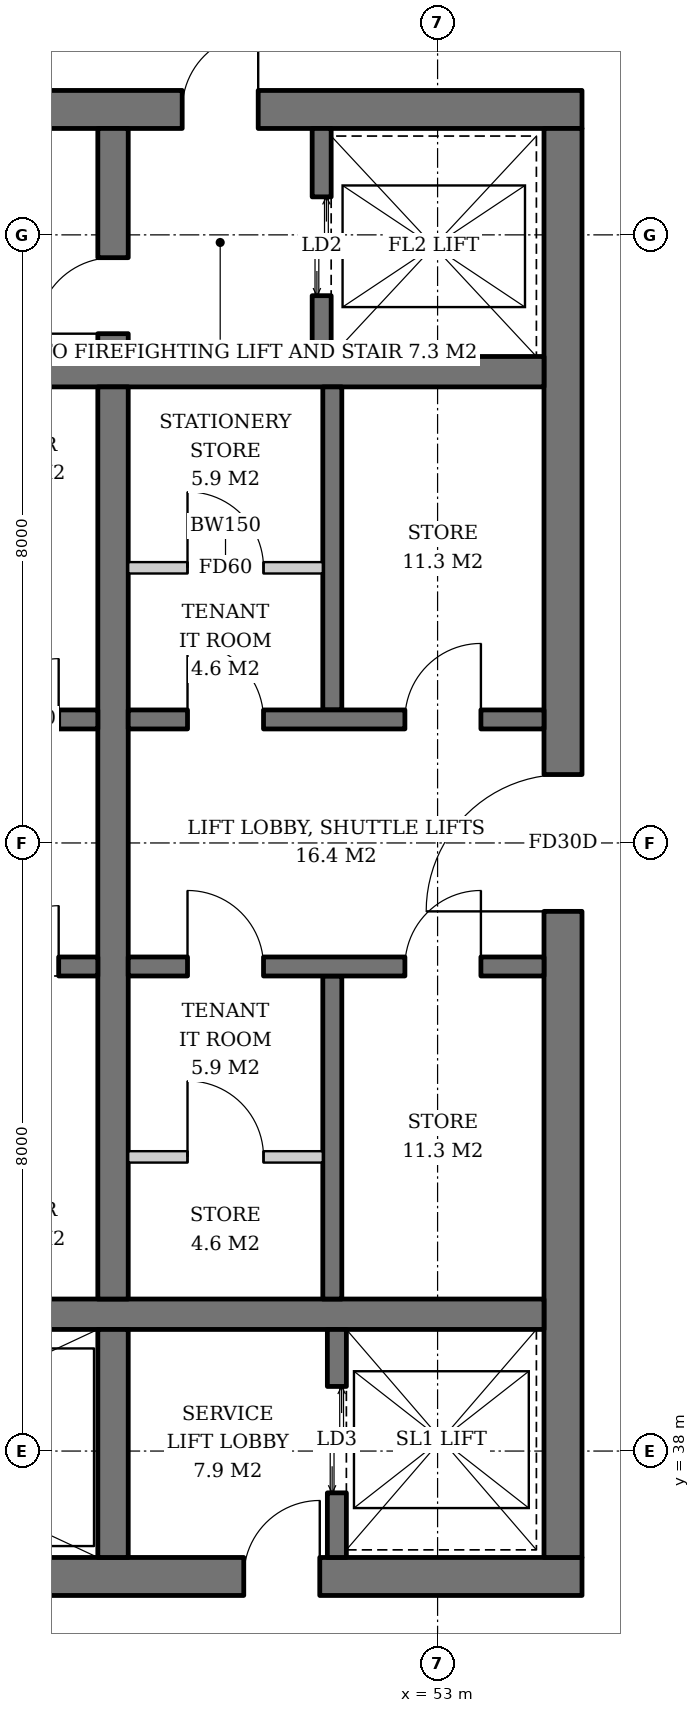
"""IFC4 building model, lengths in metres.
Left out: names, types, materials, properties, quantities, classifications, styles, units other than length and angle.
Written with IfcOpenShell. Run it as: python <this file> out.ifc"""

import sys

from ifc_helpers import new_model, si_unit, direction, frame, frame_2d, origin, place, context, subcontext, project, spatial, rectangle, extrude, element, fill, save


model = new_model("IFC4")
c1 = context("Model", 3, precision=1e-05, world=origin(), true_north=direction((0.0, 1.0)))
c2 = subcontext(c1, "Body", "Model", "MODEL_VIEW")
j1 = project(units=[si_unit("LENGTHUNIT", "METRE"), si_unit("PLANEANGLEUNIT", "RADIAN")], contexts=[c1])
p1 = place(None, origin())
s1 = spatial("IfcSite", under=j1, at=p1, CompositionType="ELEMENT")
p2 = place(p1, origin())
s2 = spatial("IfcBuilding", under=s1, at=p2, CompositionType="ELEMENT")
p3 = place(p2, frame((0.0, 0.0, 271.8)))
s3 = spatial("IfcBuildingStorey", under=s2, at=p3, CompositionType="ELEMENT", Elevation=271.8)
p4 = place(p3, frame((35.1, 36.35, 0.0), z_axis=(0.0, 0.0, 1.0), x_axis=(1.0, 0.0, 0.0)))
e1 = element("IfcWall", 1, at=p4, inside=s3, PredefinedType="SHEAR", context=c2, shape_type="SweptSolid", body=[
    extrude(rectangle(XDim=19.8, YDim=0.5, at=frame_2d((9.9, 0.0))), origin(), (0.0, 0.0, 1.0), 3.8),
])
p5 = place(p4, frame((3.9, 0.0, 0.0)))
e2 = element("IfcOpeningElement", 2, at=p5, cuts=e1, PredefinedType="OPENING", context=c2, shape_type="SweptSolid", body=[
    extrude(rectangle(XDim=1.0, YDim=2.1, at=frame_2d((0.5, 1.05))), frame((0.0, 0.26, 0.0), z_axis=(0.0, -1.0, 0.0), x_axis=(1.0, 0.0, 0.0)), (0.0, 0.0, 1.0), 0.52),
])
p6 = place(p4, frame((15.35, 0.0, 0.0)))
e3 = element("IfcOpeningElement", 3, at=p6, cuts=e1, PredefinedType="OPENING", context=c2, shape_type="SweptSolid", body=[
    extrude(rectangle(XDim=1.0, YDim=2.1, at=frame_2d((0.5, 1.05))), frame((0.0, 0.26, 0.0), z_axis=(0.0, -1.0, 0.0), x_axis=(1.0, 0.0, 0.0)), (0.0, 0.0, 1.0), 0.52),
])
p7 = place(p3, frame((35.1, 55.65, 0.0), z_axis=(0.0, 0.0, 1.0), x_axis=(1.0, 0.0, 0.0)))
e4 = element("IfcWall", 4, at=p7, inside=s3, PredefinedType="SHEAR", context=c2, shape_type="SweptSolid", body=[
    extrude(rectangle(XDim=19.8, YDim=0.5, at=frame_2d((9.9, 0.0))), origin(), (0.0, 0.0, 1.0), 3.8),
])
p8 = place(p7, frame((14.54, 0.0, 0.0)))
e5 = element("IfcOpeningElement", 5, at=p8, cuts=e4, PredefinedType="OPENING", context=c2, shape_type="SweptSolid", body=[
    extrude(rectangle(XDim=1.0, YDim=2.1, at=frame_2d((0.5, 1.05))), frame((0.0, 0.26, 0.0), z_axis=(0.0, -1.0, 0.0), x_axis=(1.0, 0.0, 0.0)), (0.0, 0.0, 1.0), 0.52),
])
p9 = place(p7, frame((2.375, 0.0, 0.0)))
e6 = element("IfcOpeningElement", 6, at=p9, cuts=e4, PredefinedType="OPENING", context=c2, shape_type="SweptSolid", body=[
    extrude(rectangle(XDim=1.0, YDim=2.1, at=frame_2d((0.5, 1.05))), frame((0.0, 0.26, 0.0), z_axis=(0.0, -1.0, 0.0), x_axis=(1.0, 0.0, 0.0)), (0.0, 0.0, 1.0), 0.52),
])
p10 = place(p3, frame((54.65, 36.6, 0.0), z_axis=(0.0, 0.0, 1.0), x_axis=(0.0, 1.0, 0.0)))
e7 = element("IfcWall", 7, at=p10, inside=s3, PredefinedType="SHEAR", context=c2, shape_type="SweptSolid", body=[
    extrude(rectangle(XDim=18.8, YDim=0.5, at=frame_2d((9.4, 0.0))), origin(), (0.0, 0.0, 1.0), 3.8),
])
p11 = place(p10, frame((8.5, 0.0, 0.0)))
e8 = element("IfcOpeningElement", 8, at=p11, cuts=e7, PredefinedType="OPENING", context=c2, shape_type="SweptSolid", body=[
    extrude(rectangle(XDim=1.8, YDim=2.4, at=frame_2d((0.9, 1.2))), frame((0.0, 0.26, 0.0), z_axis=(0.0, -1.0, 0.0), x_axis=(1.0, 0.0, 0.0)), (0.0, 0.0, 1.0), 0.52),
])
for number, where, z_axis, x_axis in (
    (9, (35.6, 39.8, 0.0), (0.0, 0.0, 1.0), (1.0, 0.0, 0.0)),
    (10, (35.6, 52.2, 0.0), (0.0, 0.0, 1.0), (1.0, 0.0, 0.0)),
):
    element("IfcWall", number, at=place(p3, frame(where, z_axis=z_axis, x_axis=x_axis)), inside=s3, PredefinedType="SHEAR", context=c2, shape_type="SweptSolid", body=[
        extrude(rectangle(XDim=18.8, YDim=0.4, at=frame_2d((9.4, 0.0))), origin(), (0.0, 0.0, 1.0), 3.8),
    ])
p12 = place(p3, frame((48.73, 36.6, 0.0), z_axis=(0.0, 0.0, 1.0), x_axis=(0.0, 1.0, 0.0)))
e11 = element("IfcWall", 11, at=p12, inside=s3, PredefinedType="SHEAR", context=c2, shape_type="SweptSolid", body=[
    extrude(rectangle(XDim=3.0, YDim=0.4, at=frame_2d((1.5, 0.0))), origin(), (0.0, 0.0, 1.0), 3.8),
])
p13 = place(p3, frame((48.73, 40.0, 0.0), z_axis=(0.0, 0.0, 1.0), x_axis=(0.0, 1.0, 0.0)))
e12 = element("IfcWall", 12, at=p13, inside=s3, PredefinedType="SHEAR", context=c2, shape_type="SweptSolid", body=[
    extrude(rectangle(XDim=12.0, YDim=0.4, at=frame_2d((6.0, 0.0))), origin(), (0.0, 0.0, 1.0), 3.8),
])
p14 = place(p3, frame((48.73, 52.4, 0.0), z_axis=(0.0, 0.0, 1.0), x_axis=(0.0, 1.0, 0.0)))
e13 = element("IfcWall", 13, at=p14, inside=s3, PredefinedType="SHEAR", context=c2, shape_type="SweptSolid", body=[
    extrude(rectangle(XDim=3.0, YDim=0.4, at=frame_2d((1.5, 0.0))), origin(), (0.0, 0.0, 1.0), 3.8),
])
p15 = place(p14, frame((0.3, 0.0, 0.0)))
e14 = element("IfcOpeningElement", 14, at=p15, cuts=e13, PredefinedType="OPENING", context=c2, shape_type="SweptSolid", body=[
    extrude(rectangle(XDim=1.0, YDim=2.1, at=frame_2d((0.5, 1.05))), frame((0.0, 0.21, 0.0), z_axis=(0.0, -1.0, 0.0), x_axis=(1.0, 0.0, 0.0)), (0.0, 0.0, 1.0), 0.42),
])
p16 = place(p3, frame((51.675, 36.6, 0.0), z_axis=(0.0, 0.0, 1.0), x_axis=(0.0, 1.0, 0.0)))
e15 = element("IfcWall", 15, at=p16, inside=s3, PredefinedType="SHEAR", context=c2, shape_type="SweptSolid", body=[
    extrude(rectangle(XDim=3.0, YDim=0.25, at=frame_2d((1.5, 0.0))), origin(), (0.0, 0.0, 1.0), 3.8),
])
p17 = place(p16, frame((0.85, 0.0, 0.0)))
e16 = element("IfcOpeningElement", 16, at=p17, cuts=e15, PredefinedType="OPENING", context=c2, shape_type="SweptSolid", body=[
    extrude(rectangle(XDim=1.4, YDim=2.4, at=frame_2d((0.7, 1.2))), frame((0.0, 0.135, 0.0), z_axis=(0.0, -1.0, 0.0), x_axis=(1.0, 0.0, 0.0)), (0.0, 0.0, 1.0), 0.27),
])
p18 = place(p3, frame((51.475, 52.4, 0.0), z_axis=(0.0, 0.0, 1.0), x_axis=(0.0, 1.0, 0.0)))
e17 = element("IfcWall", 17, at=p18, inside=s3, PredefinedType="SHEAR", context=c2, shape_type="SweptSolid", body=[
    extrude(rectangle(XDim=3.0, YDim=0.25, at=frame_2d((1.5, 0.0))), origin(), (0.0, 0.0, 1.0), 3.8),
])
p19 = place(p18, frame((0.8, 0.0, 0.0)))
e18 = element("IfcOpeningElement", 18, at=p19, cuts=e17, PredefinedType="OPENING", context=c2, shape_type="SweptSolid", body=[
    extrude(rectangle(XDim=1.3, YDim=2.2, at=frame_2d((0.65, 1.1))), frame((0.0, 0.135, 0.0), z_axis=(0.0, -1.0, 0.0), x_axis=(1.0, 0.0, 0.0)), (0.0, 0.0, 1.0), 0.27),
])
p20 = place(p3, frame((35.6, 47.625, 0.0), z_axis=(0.0, 0.0, 1.0), x_axis=(1.0, 0.0, 0.0)))
e19 = element("IfcWall", 19, at=p20, inside=s3, PredefinedType="SHEAR", context=c2, shape_type="SweptSolid", body=[
    extrude(rectangle(XDim=12.93, YDim=0.25, at=frame_2d((6.465, 0.0))), origin(), (0.0, 0.0, 1.0), 3.8),
])
p21 = place(p20, frame((0.75, 0.0, 0.0)))
e20 = element("IfcOpeningElement", 20, at=p21, cuts=e19, PredefinedType="OPENING", context=c2, shape_type="SweptSolid", body=[
    extrude(rectangle(XDim=1.1, YDim=2.2, at=frame_2d((0.55, 1.1))), frame((0.0, 0.135, 0.0), z_axis=(0.0, -1.0, 0.0), x_axis=(1.0, 0.0, 0.0)), (0.0, 0.0, 1.0), 0.27),
])
p22 = place(p20, frame((3.55, 0.0, 0.0)))
e21 = element("IfcOpeningElement", 21, at=p22, cuts=e19, PredefinedType="OPENING", context=c2, shape_type="SweptSolid", body=[
    extrude(rectangle(XDim=1.1, YDim=2.2, at=frame_2d((0.55, 1.1))), frame((0.0, 0.135, 0.0), z_axis=(0.0, -1.0, 0.0), x_axis=(1.0, 0.0, 0.0)), (0.0, 0.0, 1.0), 0.27),
])
p23 = place(p20, frame((6.3, 0.0, 0.0)))
e22 = element("IfcOpeningElement", 22, at=p23, cuts=e19, PredefinedType="OPENING", context=c2, shape_type="SweptSolid", body=[
    extrude(rectangle(XDim=1.1, YDim=2.2, at=frame_2d((0.55, 1.1))), frame((0.0, 0.135, 0.0), z_axis=(0.0, -1.0, 0.0), x_axis=(1.0, 0.0, 0.0)), (0.0, 0.0, 1.0), 0.27),
])
p24 = place(p20, frame((9.1, 0.0, 0.0)))
e23 = element("IfcOpeningElement", 23, at=p24, cuts=e19, PredefinedType="OPENING", context=c2, shape_type="SweptSolid", body=[
    extrude(rectangle(XDim=1.0, YDim=2.1, at=frame_2d((0.5, 1.05))), frame((0.0, 0.135, 0.0), z_axis=(0.0, -1.0, 0.0), x_axis=(1.0, 0.0, 0.0)), (0.0, 0.0, 1.0), 0.27),
])
p25 = place(p20, frame((11.615, 0.0, 0.0)))
e24 = element("IfcOpeningElement", 24, at=p25, cuts=e19, PredefinedType="OPENING", context=c2, shape_type="SweptSolid", body=[
    extrude(rectangle(XDim=0.8, YDim=2.0, at=frame_2d((0.4, 1.0))), frame((0.0, 0.135, 0.0), z_axis=(0.0, -1.0, 0.0), x_axis=(1.0, 0.0, 0.0)), (0.0, 0.0, 1.0), 0.27),
])
p26 = place(p3, frame((35.6, 44.375, 0.0), z_axis=(0.0, 0.0, 1.0), x_axis=(1.0, 0.0, 0.0)))
e25 = element("IfcWall", 25, at=p26, inside=s3, PredefinedType="SHEAR", context=c2, shape_type="SweptSolid", body=[
    extrude(rectangle(XDim=12.93, YDim=0.25, at=frame_2d((6.465, 0.0))), origin(), (0.0, 0.0, 1.0), 3.8),
])
p27 = place(p26, frame((0.75, 0.0, 0.0)))
e26 = element("IfcOpeningElement", 26, at=p27, cuts=e25, PredefinedType="OPENING", context=c2, shape_type="SweptSolid", body=[
    extrude(rectangle(XDim=1.1, YDim=2.2, at=frame_2d((0.55, 1.1))), frame((0.0, 0.135, 0.0), z_axis=(0.0, -1.0, 0.0), x_axis=(1.0, 0.0, 0.0)), (0.0, 0.0, 1.0), 0.27),
])
p28 = place(p26, frame((3.55, 0.0, 0.0)))
e27 = element("IfcOpeningElement", 27, at=p28, cuts=e25, PredefinedType="OPENING", context=c2, shape_type="SweptSolid", body=[
    extrude(rectangle(XDim=1.1, YDim=2.2, at=frame_2d((0.55, 1.1))), frame((0.0, 0.135, 0.0), z_axis=(0.0, -1.0, 0.0), x_axis=(1.0, 0.0, 0.0)), (0.0, 0.0, 1.0), 0.27),
])
p29 = place(p26, frame((6.3, 0.0, 0.0)))
e28 = element("IfcOpeningElement", 28, at=p29, cuts=e25, PredefinedType="OPENING", context=c2, shape_type="SweptSolid", body=[
    extrude(rectangle(XDim=1.1, YDim=2.2, at=frame_2d((0.55, 1.1))), frame((0.0, 0.135, 0.0), z_axis=(0.0, -1.0, 0.0), x_axis=(1.0, 0.0, 0.0)), (0.0, 0.0, 1.0), 0.27),
])
p30 = place(p26, frame((9.1, 0.0, 0.0)))
e29 = element("IfcOpeningElement", 29, at=p30, cuts=e25, PredefinedType="OPENING", context=c2, shape_type="SweptSolid", body=[
    extrude(rectangle(XDim=1.0, YDim=2.1, at=frame_2d((0.5, 1.05))), frame((0.0, 0.135, 0.0), z_axis=(0.0, -1.0, 0.0), x_axis=(1.0, 0.0, 0.0)), (0.0, 0.0, 1.0), 0.27),
])
p31 = place(p26, frame((11.615, 0.0, 0.0)))
e30 = element("IfcOpeningElement", 30, at=p31, cuts=e25, PredefinedType="OPENING", context=c2, shape_type="SweptSolid", body=[
    extrude(rectangle(XDim=0.8, YDim=2.0, at=frame_2d((0.4, 1.0))), frame((0.0, 0.135, 0.0), z_axis=(0.0, -1.0, 0.0), x_axis=(1.0, 0.0, 0.0)), (0.0, 0.0, 1.0), 0.27),
])
p32 = place(p3, frame((51.615, 47.75, 0.0), z_axis=(0.0, 0.0, 1.0), x_axis=(0.0, 1.0, 0.0)))
e31 = element("IfcWall", 31, at=p32, inside=s3, PredefinedType="SHEAR", context=c2, shape_type="SweptSolid", body=[
    extrude(rectangle(XDim=4.25, YDim=0.25, at=frame_2d((2.125, 0.0))), origin(), (0.0, 0.0, 1.0), 3.8),
])
p33 = place(p3, frame((48.93, 47.625, 0.0), z_axis=(0.0, 0.0, 1.0), x_axis=(1.0, 0.0, 0.0)))
e32 = element("IfcWall", 32, at=p33, inside=s3, PredefinedType="SHEAR", context=c2, shape_type="SweptSolid", body=[
    extrude(rectangle(XDim=5.47, YDim=0.25, at=frame_2d((2.735, 0.0))), origin(), (0.0, 0.0, 1.0), 3.8),
])
p34 = place(p33, frame((0.78, 0.0, 0.0)))
e33 = element("IfcOpeningElement", 33, at=p34, cuts=e32, PredefinedType="OPENING", context=c2, shape_type="SweptSolid", body=[
    extrude(rectangle(XDim=1.0, YDim=2.1, at=frame_2d((0.5, 1.05))), frame((0.0, 0.135, 0.0), z_axis=(0.0, -1.0, 0.0), x_axis=(1.0, 0.0, 0.0)), (0.0, 0.0, 1.0), 0.27),
])
p35 = place(p33, frame((3.64, 0.0, 0.0)))
e34 = element("IfcOpeningElement", 34, at=p35, cuts=e32, PredefinedType="OPENING", context=c2, shape_type="SweptSolid", body=[
    extrude(rectangle(XDim=1.0, YDim=2.1, at=frame_2d((0.5, 1.05))), frame((0.0, 0.135, 0.0), z_axis=(0.0, -1.0, 0.0), x_axis=(1.0, 0.0, 0.0)), (0.0, 0.0, 1.0), 0.27),
])
p36 = place(p3, frame((51.615, 44.25, 0.0), z_axis=(0.0, 0.0, 1.0), x_axis=(0.0, -1.0, 0.0)))
e35 = element("IfcWall", 35, at=p36, inside=s3, PredefinedType="SHEAR", context=c2, shape_type="SweptSolid", body=[
    extrude(rectangle(XDim=4.25, YDim=0.25, at=frame_2d((2.125, 0.0))), origin(), (0.0, 0.0, 1.0), 3.8),
])
p37 = place(p3, frame((48.93, 44.375, 0.0), z_axis=(0.0, 0.0, 1.0), x_axis=(1.0, 0.0, 0.0)))
e36 = element("IfcWall", 36, at=p37, inside=s3, PredefinedType="SHEAR", context=c2, shape_type="SweptSolid", body=[
    extrude(rectangle(XDim=5.47, YDim=0.25, at=frame_2d((2.735, 0.0))), origin(), (0.0, 0.0, 1.0), 3.8),
])
p38 = place(p37, frame((0.78, 0.0, 0.0)))
e37 = element("IfcOpeningElement", 37, at=p38, cuts=e36, PredefinedType="OPENING", context=c2, shape_type="SweptSolid", body=[
    extrude(rectangle(XDim=1.0, YDim=2.1, at=frame_2d((0.5, 1.05))), frame((0.0, 0.135, 0.0), z_axis=(0.0, -1.0, 0.0), x_axis=(1.0, 0.0, 0.0)), (0.0, 0.0, 1.0), 0.27),
])
p39 = place(p37, frame((3.64, 0.0, 0.0)))
e38 = element("IfcOpeningElement", 38, at=p39, cuts=e36, PredefinedType="OPENING", context=c2, shape_type="SweptSolid", body=[
    extrude(rectangle(XDim=1.0, YDim=2.1, at=frame_2d((0.5, 1.05))), frame((0.0, 0.135, 0.0), z_axis=(0.0, -1.0, 0.0), x_axis=(1.0, 0.0, 0.0)), (0.0, 0.0, 1.0), 0.27),
])
p40 = place(p3, frame((48.93, 49.62, 0.0), z_axis=(0.0, 0.0, 1.0), x_axis=(1.0, 0.0, 0.0)))
e39 = element("IfcWall", 39, at=p40, inside=s3, PredefinedType="SOLIDWALL", context=c2, shape_type="SweptSolid", body=[
    extrude(rectangle(XDim=2.56, YDim=0.15, at=frame_2d((1.28, 0.0))), origin(), (0.0, 0.0, 1.0), 3.62),
])
p41 = place(p40, frame((0.78, 0.0, 0.0)))
e40 = element("IfcOpeningElement", 40, at=p41, cuts=e39, PredefinedType="OPENING", context=c2, shape_type="SweptSolid", body=[
    extrude(rectangle(XDim=1.0, YDim=2.1, at=frame_2d((0.5, 1.05))), frame((0.0, 0.085, 0.0), z_axis=(0.0, -1.0, 0.0), x_axis=(1.0, 0.0, 0.0)), (0.0, 0.0, 1.0), 0.17),
])
p42 = place(p3, frame((48.93, 41.87, 0.0), z_axis=(0.0, 0.0, 1.0), x_axis=(1.0, 0.0, 0.0)))
e41 = element("IfcWall", 41, at=p42, inside=s3, PredefinedType="SOLIDWALL", context=c2, shape_type="SweptSolid", body=[
    extrude(rectangle(XDim=2.56, YDim=0.15, at=frame_2d((1.28, 0.0))), origin(), (0.0, 0.0, 1.0), 3.62),
])
p43 = place(p42, frame((0.78, 0.0, 0.0)))
e42 = element("IfcOpeningElement", 42, at=p43, cuts=e41, PredefinedType="OPENING", context=c2, shape_type="SweptSolid", body=[
    extrude(rectangle(XDim=1.0, YDim=2.1, at=frame_2d((0.5, 1.05))), frame((0.0, 0.085, 0.0), z_axis=(0.0, -1.0, 0.0), x_axis=(1.0, 0.0, 0.0)), (0.0, 0.0, 1.0), 0.17),
])
p44 = place(p17, origin())
e43 = element("IfcDoor", 43, at=p44, inside=s3, OperationType="DOUBLE_DOOR_SLIDING", PredefinedType="DOOR", context=c2, shape_type="SweptSolid", body=[
    extrude(rectangle(XDim=1.4, YDim=2.4, at=frame_2d((0.7, 1.2))), frame((0.0, 0.025, 0.0), z_axis=(0.0, -1.0, 0.0), x_axis=(1.0, 0.0, 0.0)), (0.0, 0.0, 1.0), 0.05),
])
fill(e16, e43)
p45 = place(p19, origin())
e44 = element("IfcDoor", 44, at=p45, inside=s3, OperationType="DOUBLE_DOOR_SLIDING", PredefinedType="DOOR", context=c2, shape_type="SweptSolid", body=[
    extrude(rectangle(XDim=1.3, YDim=2.2, at=frame_2d((0.65, 1.1))), frame((0.0, 0.025, 0.0), z_axis=(0.0, -1.0, 0.0), x_axis=(1.0, 0.0, 0.0)), (0.0, 0.0, 1.0), 0.05),
])
fill(e18, e44)
p46 = place(p25, origin())
e45 = element("IfcDoor", 45, at=p46, inside=s3, OperationType="SINGLE_SWING_RIGHT", PredefinedType="DOOR", context=c2, shape_type="SweptSolid", body=[
    extrude(rectangle(XDim=0.8, YDim=2.0, at=frame_2d((0.4, 1.0))), frame((0.0, 0.025, 0.0), z_axis=(0.0, -1.0, 0.0), x_axis=(1.0, 0.0, 0.0)), (0.0, 0.0, 1.0), 0.05),
])
fill(e24, e45)
p47 = place(p31, origin())
e46 = element("IfcDoor", 46, at=p47, inside=s3, OperationType="SINGLE_SWING_RIGHT", PredefinedType="DOOR", context=c2, shape_type="SweptSolid", body=[
    extrude(rectangle(XDim=0.8, YDim=2.0, at=frame_2d((0.4, 1.0))), frame((0.0, 0.025, 0.0), z_axis=(0.0, -1.0, 0.0), x_axis=(1.0, 0.0, 0.0)), (0.0, 0.0, 1.0), 0.05),
])
fill(e30, e46)
p48 = place(p34, origin())
e47 = element("IfcDoor", 47, at=p48, inside=s3, OperationType="SINGLE_SWING_LEFT", PredefinedType="DOOR", context=c2, shape_type="SweptSolid", body=[
    extrude(rectangle(XDim=1.0, YDim=2.1, at=frame_2d((0.5, 1.05))), frame((0.0, 0.025, 0.0), z_axis=(0.0, -1.0, 0.0), x_axis=(1.0, 0.0, 0.0)), (0.0, 0.0, 1.0), 0.05),
])
fill(e33, e47)
p49 = place(p35, origin())
e48 = element("IfcDoor", 48, at=p49, inside=s3, OperationType="SINGLE_SWING_RIGHT", PredefinedType="DOOR", context=c2, shape_type="SweptSolid", body=[
    extrude(rectangle(XDim=1.0, YDim=2.1, at=frame_2d((0.5, 1.05))), frame((0.0, 0.025, 0.0), z_axis=(0.0, -1.0, 0.0), x_axis=(1.0, 0.0, 0.0)), (0.0, 0.0, 1.0), 0.05),
])
fill(e34, e48)
p50 = place(p38, origin())
e49 = element("IfcDoor", 49, at=p50, inside=s3, OperationType="SINGLE_SWING_LEFT", PredefinedType="DOOR", context=c2, shape_type="SweptSolid", body=[
    extrude(rectangle(XDim=1.0, YDim=2.1, at=frame_2d((0.5, 1.05))), frame((0.0, 0.025, 0.0), z_axis=(0.0, -1.0, 0.0), x_axis=(1.0, 0.0, 0.0)), (0.0, 0.0, 1.0), 0.05),
])
fill(e37, e49)
p51 = place(p39, origin())
e50 = element("IfcDoor", 50, at=p51, inside=s3, OperationType="SINGLE_SWING_RIGHT", PredefinedType="DOOR", context=c2, shape_type="SweptSolid", body=[
    extrude(rectangle(XDim=1.0, YDim=2.1, at=frame_2d((0.5, 1.05))), frame((0.0, 0.025, 0.0), z_axis=(0.0, -1.0, 0.0), x_axis=(1.0, 0.0, 0.0)), (0.0, 0.0, 1.0), 0.05),
])
fill(e38, e50)
p52 = place(p41, origin())
e51 = element("IfcDoor", 51, at=p52, inside=s3, OperationType="SINGLE_SWING_LEFT", PredefinedType="DOOR", context=c2, shape_type="SweptSolid", body=[
    extrude(rectangle(XDim=1.0, YDim=2.1, at=frame_2d((0.5, 1.05))), frame((0.0, 0.025, 0.0), z_axis=(0.0, -1.0, 0.0), x_axis=(1.0, 0.0, 0.0)), (0.0, 0.0, 1.0), 0.05),
])
fill(e40, e51)
p53 = place(p43, origin())
e52 = element("IfcDoor", 52, at=p53, inside=s3, OperationType="SINGLE_SWING_LEFT", PredefinedType="DOOR", context=c2, shape_type="SweptSolid", body=[
    extrude(rectangle(XDim=1.0, YDim=2.1, at=frame_2d((0.5, 1.05))), frame((0.0, 0.025, 0.0), z_axis=(0.0, -1.0, 0.0), x_axis=(1.0, 0.0, 0.0)), (0.0, 0.0, 1.0), 0.05),
])
fill(e42, e52)
p54 = place(p15, origin())
e53 = element("IfcDoor", 53, at=p54, inside=s3, OperationType="SINGLE_SWING_LEFT", PredefinedType="DOOR", context=c2, shape_type="SweptSolid", body=[
    extrude(rectangle(XDim=1.0, YDim=2.1, at=frame_2d((0.5, 1.05))), frame((0.0, 0.025, 0.0), z_axis=(0.0, -1.0, 0.0), x_axis=(1.0, 0.0, 0.0)), (0.0, 0.0, 1.0), 0.05),
])
fill(e14, e53)
p55 = place(p8, origin())
e54 = element("IfcDoor", 54, at=p55, inside=s3, OperationType="SINGLE_SWING_RIGHT", PredefinedType="DOOR", context=c2, shape_type="SweptSolid", body=[
    extrude(rectangle(XDim=1.0, YDim=2.1, at=frame_2d((0.5, 1.05))), frame((0.0, 0.025, 0.0), z_axis=(0.0, -1.0, 0.0), x_axis=(1.0, 0.0, 0.0)), (0.0, 0.0, 1.0), 0.05),
])
fill(e5, e54)
p56 = place(p11, origin())
e55 = element("IfcDoor", 55, at=p56, inside=s3, OperationType="DOUBLE_DOOR_SINGLE_SWING", PredefinedType="DOOR", context=c2, shape_type="SweptSolid", body=[
    extrude(rectangle(XDim=1.8, YDim=2.4, at=frame_2d((0.9, 1.2))), frame((0.0, 0.025, 0.0), z_axis=(0.0, -1.0, 0.0), x_axis=(1.0, 0.0, 0.0)), (0.0, 0.0, 1.0), 0.05),
])
fill(e8, e55)
p57 = place(p6, origin())
e56 = element("IfcDoor", 56, at=p57, inside=s3, OperationType="SINGLE_SWING_RIGHT", PredefinedType="DOOR", context=c2, shape_type="SweptSolid", body=[
    extrude(rectangle(XDim=1.0, YDim=2.1, at=frame_2d((0.5, 1.05))), frame((0.0, 0.025, 0.0), z_axis=(0.0, -1.0, 0.0), x_axis=(1.0, 0.0, 0.0)), (0.0, 0.0, 1.0), 0.05),
])
fill(e3, e56)
save(model, sys.argv[1])
